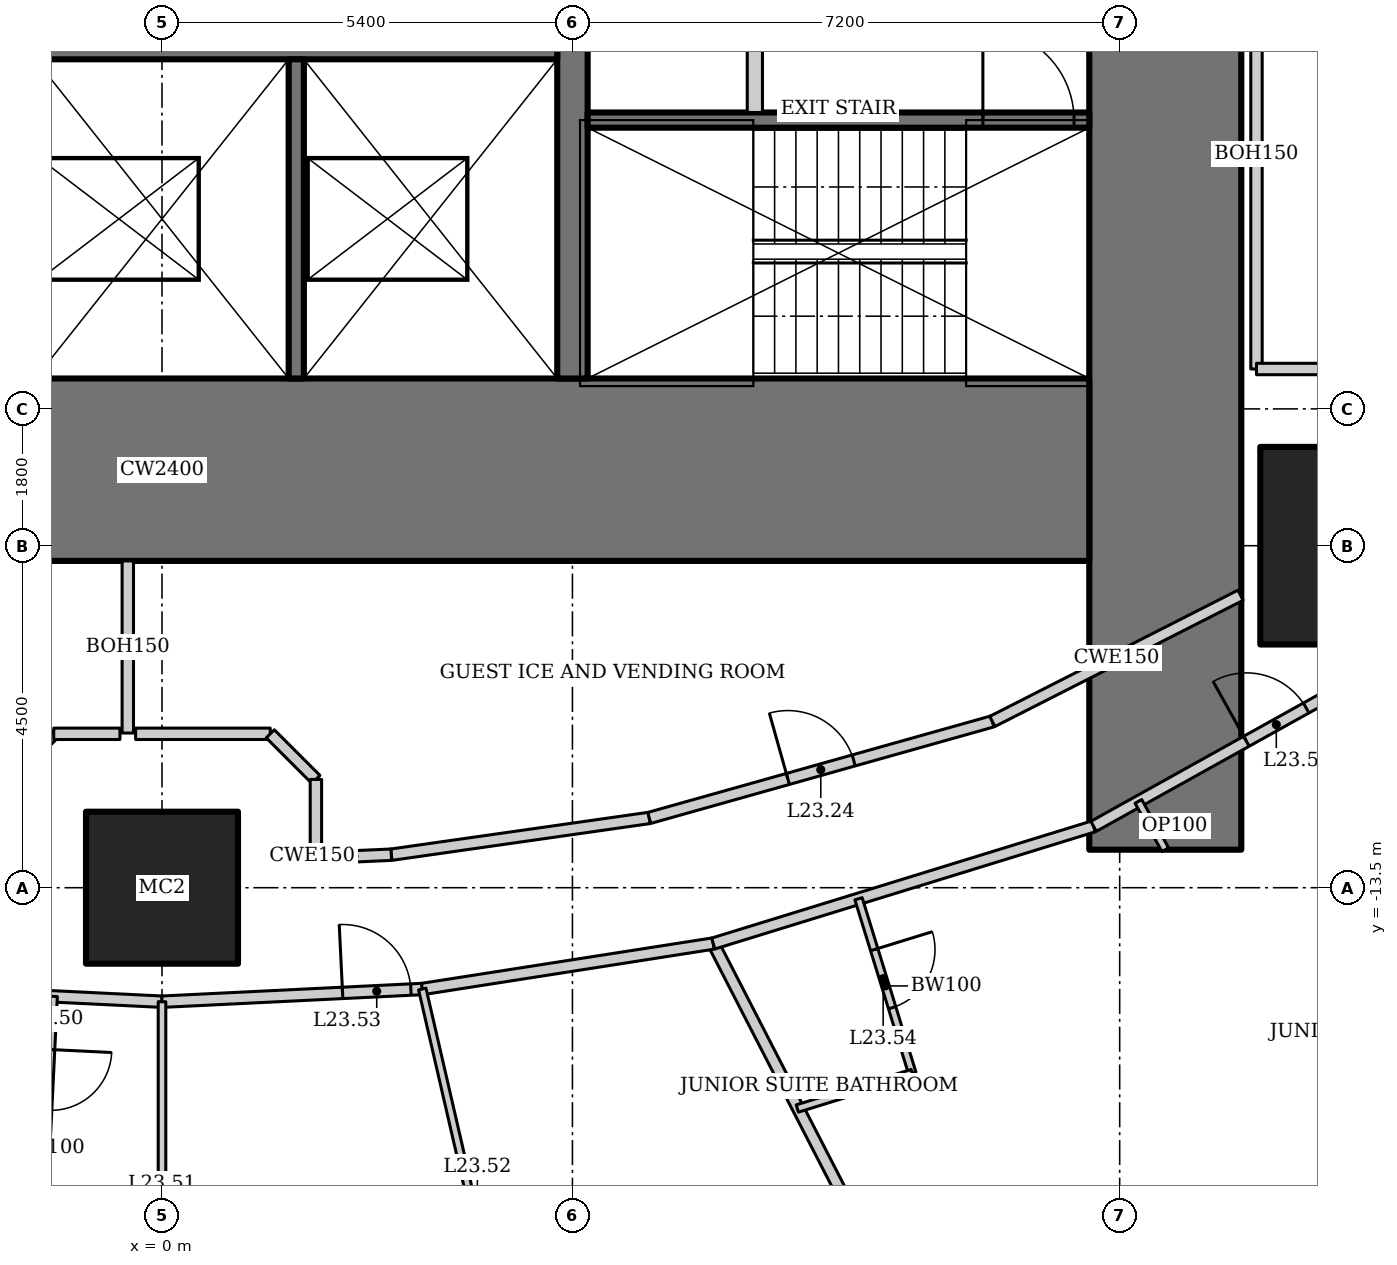
"""IFC4 building model, lengths in metres.
Left out: names, types, materials, properties, quantities, classifications, styles, units other than length and angle.
Written with IfcOpenShell. Run it as: python <this file> out.ifc"""

import sys

from ifc_helpers import new_model, si_unit, direction, frame, frame_2d, origin, origin_2d, place, context, subcontext, project, spatial, rectangle, hollow_rectangle, extrude, element, fill, save


model = new_model("IFC4")
c1 = context("Model", 3, precision=1e-05, world=origin(), true_north=direction((0.0, 1.0)))
c2 = subcontext(c1, "Body", "Model", "MODEL_VIEW")
j1 = project(units=[si_unit("LENGTHUNIT", "METRE"), si_unit("PLANEANGLEUNIT", "RADIAN")], contexts=[c1])
p1 = place(None, origin())
s1 = spatial("IfcSite", under=j1, at=p1, CompositionType="ELEMENT")
p2 = place(p1, origin())
s2 = spatial("IfcBuilding", under=s1, at=p2, CompositionType="ELEMENT")
p3 = place(p2, frame((0.0, 0.0, 98.2)))
s3 = spatial("IfcBuildingStorey", under=s2, at=p3, CompositionType="ELEMENT", Elevation=98.2)
p4 = place(p3, frame((0.0, -13.5, 0.0), z_axis=(0.0, 0.0, 1.0), x_axis=(1.0, 0.0, 0.0)))
e1 = element("IfcColumn", 1, at=p4, inside=s3, PredefinedType="COLUMN", context=c2, shape_type="SweptSolid", body=[
    extrude(hollow_rectangle(XDim=2.0, YDim=2.0, WallThickness=0.17, at=origin_2d()), origin(), (0.0, 0.0, 1.0), 3.6),
])
p5 = place(p3, frame((15.75, -9.0, 0.0), z_axis=(0.0, 0.0, 1.0), x_axis=(1.0, 0.0, 0.0)))
e2 = element("IfcColumn", 2, at=p5, inside=s3, PredefinedType="COLUMN", context=c2, shape_type="SweptSolid", body=[
    extrude(hollow_rectangle(XDim=2.6, YDim=2.6, WallThickness=0.13, at=origin_2d()), origin(), (0.0, 0.0, 1.0), 3.6),
])
p6 = place(p3, frame((13.2, -13.0, 0.0), z_axis=(0.0, 0.0, 1.0), x_axis=(0.0, 1.0, 0.0)))
e3 = element("IfcWall", 3, at=p6, inside=s3, PredefinedType="SHEAR", context=c2, shape_type="SweptSolid", body=[
    extrude(rectangle(XDim=26.0, YDim=2.0, at=frame_2d((13.0, 0.0))), origin(), (0.0, 0.0, 1.0), 3.6),
])
p7 = place(p6, frame((12.1, 0.0, 0.0)))
e4 = element("IfcOpeningElement", 4, at=p7, cuts=e3, PredefinedType="OPENING", context=c2, shape_type="SweptSolid", body=[
    extrude(rectangle(XDim=1.8, YDim=2.1, at=frame_2d((0.9, 1.05))), frame((0.0, 1.01, 0.0), z_axis=(0.0, -1.0, 0.0), x_axis=(1.0, 0.0, 0.0)), (0.0, 0.0, 1.0), 2.02),
])
p8 = place(p3, frame((-12.2, -8.0, 0.0), z_axis=(0.0, 0.0, 1.0), x_axis=(1.0, 0.0, 0.0)))
e5 = element("IfcWall", 5, at=p8, inside=s3, PredefinedType="SHEAR", context=c2, shape_type="SweptSolid", body=[
    extrude(rectangle(XDim=24.4, YDim=2.4, at=frame_2d((12.2, 0.0))), origin(), (0.0, 0.0, 1.0), 3.6),
])
p9 = place(p3, frame((5.4, -6.8, 0.0), z_axis=(0.0, 0.0, 1.0), x_axis=(0.0, 1.0, 0.0)))
e6 = element("IfcWall", 6, at=p9, inside=s3, PredefinedType="SHEAR", context=c2, shape_type="SweptSolid", body=[
    extrude(rectangle(XDim=13.6, YDim=0.4, at=frame_2d((6.8, 0.0))), origin(), (0.0, 0.0, 1.0), 3.6),
])
p10 = place(p9, frame((5.9, 0.0, 0.0)))
e7 = element("IfcOpeningElement", 7, at=p10, cuts=e6, PredefinedType="OPENING", context=c2, shape_type="SweptSolid", body=[
    extrude(rectangle(XDim=1.8, YDim=2.1, at=frame_2d((0.9, 1.05))), frame((0.0, 0.21, 0.0), z_axis=(0.0, -1.0, 0.0), x_axis=(1.0, 0.0, 0.0)), (0.0, 0.0, 1.0), 0.42),
])
p11 = place(p3, frame((-5.2, -2.4, 0.0), z_axis=(0.0, 0.0, 1.0), x_axis=(1.0, 0.0, 0.0)))
e8 = element("IfcWall", 8, at=p11, inside=s3, PredefinedType="SHEAR", context=c2, shape_type="SweptSolid", body=[
    extrude(rectangle(XDim=10.4, YDim=0.4, at=frame_2d((5.2, 0.0))), origin(), (0.0, 0.0, 1.0), 3.6),
])
p12 = place(p11, frame((0.55, 0.0, 0.0)))
e9 = element("IfcOpeningElement", 9, at=p12, cuts=e8, PredefinedType="OPENING", context=c2, shape_type="SweptSolid", body=[
    extrude(rectangle(XDim=1.1, YDim=2.2, at=frame_2d((0.55, 1.1))), frame((0.0, 0.21, 0.0), z_axis=(0.0, -1.0, 0.0), x_axis=(1.0, 0.0, 0.0)), (0.0, 0.0, 1.0), 0.42),
])
p13 = place(p11, frame((4.083, 0.0, 0.0)))
e10 = element("IfcOpeningElement", 10, at=p13, cuts=e8, PredefinedType="OPENING", context=c2, shape_type="SweptSolid", body=[
    extrude(rectangle(XDim=1.1, YDim=2.2, at=frame_2d((0.55, 1.1))), frame((0.0, 0.21, 0.0), z_axis=(0.0, -1.0, 0.0), x_axis=(1.0, 0.0, 0.0)), (0.0, 0.0, 1.0), 0.42),
])
p14 = place(p11, frame((7.617, 0.0, 0.0)))
e11 = element("IfcOpeningElement", 11, at=p14, cuts=e8, PredefinedType="OPENING", context=c2, shape_type="SweptSolid", body=[
    extrude(rectangle(XDim=1.1, YDim=2.2, at=frame_2d((0.55, 1.1))), frame((0.0, 0.21, 0.0), z_axis=(0.0, -1.0, 0.0), x_axis=(1.0, 0.0, 0.0)), (0.0, 0.0, 1.0), 0.42),
])
p15 = place(p3, frame((1.767, -2.6, 0.0), z_axis=(0.0, 0.0, 1.0), x_axis=(0.0, -1.0, 0.0)))
e12 = element("IfcWall", 12, at=p15, inside=s3, PredefinedType="SOLIDWALL", context=c2, shape_type="SweptSolid", body=[
    extrude(rectangle(XDim=4.2, YDim=0.2, at=frame_2d((2.1, 0.0))), origin(), (0.0, 0.0, 1.0), 3.6),
])
p16 = place(p3, frame((5.6, -3.4, 0.0), z_axis=(0.0, 0.0, 1.0), x_axis=(1.0, 0.0, 0.0)))
e13 = element("IfcWall", 13, at=p16, inside=s3, PredefinedType="SHEAR", context=c2, shape_type="SweptSolid", body=[
    extrude(rectangle(XDim=6.6, YDim=0.2, at=frame_2d((3.3, 0.0))), origin(), (0.0, 0.0, 1.0), 3.6),
])
p17 = place(p16, frame((5.2, 0.0, 0.0)))
e14 = element("IfcOpeningElement", 14, at=p17, cuts=e13, PredefinedType="OPENING", context=c2, shape_type="SweptSolid", body=[
    extrude(rectangle(XDim=1.2, YDim=2.1, at=frame_2d((0.6, 1.05))), frame((0.0, 0.11, 0.0), z_axis=(0.0, -1.0, 0.0), x_axis=(1.0, 0.0, 0.0)), (0.0, 0.0, 1.0), 0.22),
])
p18 = place(p3, frame((7.8, -1.4, 0.0), z_axis=(0.0, 0.0, 1.0), x_axis=(0.0, -1.0, 0.0)))
e15 = element("IfcWall", 15, at=p18, inside=s3, PredefinedType="SOLIDWALL", context=c2, shape_type="SweptSolid", body=[
    extrude(rectangle(XDim=1.9, YDim=0.2, at=frame_2d((0.95, 0.0))), origin(), (0.0, 0.0, 1.0), 3.45),
])
p19 = place(p3, frame((10.912, -21.346, 0.0), z_axis=(0.0, 0.0, 1.0), x_axis=(-0.45752665959, 0.889195904042, 0.0)))
e16 = element("IfcWall", 16, at=p19, inside=s3, PredefinedType="PARTITIONING", context=c2, shape_type="SweptSolid", body=[
    extrude(rectangle(XDim=7.997, YDim=0.15, at=frame_2d((3.999, 0.0))), origin(), (0.0, 0.0, 1.0), 2.528),
])
p20 = place(p3, frame((-3.424, -14.833, 0.0), z_axis=(0.0, 0.0, 1.0), x_axis=(0.998809560203, -0.048779733975, 0.0)))
e17 = element("IfcWall", 17, at=p20, inside=s3, PredefinedType="PARTITIONING", context=c2, shape_type="SweptSolid", body=[
    extrude(rectangle(XDim=3.428, YDim=0.15, at=frame_2d((1.714, 0.0))), origin(), (0.0, 0.0, 1.0), 3.45),
])
p21 = place(p3, frame((0.0, -15.0, 0.0), z_axis=(0.0, 0.0, 1.0), x_axis=(0.998809560203, 0.048779733975, 0.0)))
e18 = element("IfcWall", 18, at=p21, inside=s3, PredefinedType="PARTITIONING", context=c2, shape_type="SweptSolid", body=[
    extrude(rectangle(XDim=3.428, YDim=0.15, at=frame_2d((1.714, 0.0))), origin(), (0.0, 0.0, 1.0), 3.45),
])
p22 = place(p21, frame((2.378, 0.0, 0.0)))
e19 = element("IfcOpeningElement", 19, at=p22, cuts=e18, PredefinedType="OPENING", context=c2, shape_type="SweptSolid", body=[
    extrude(rectangle(XDim=0.9, YDim=2.1, at=frame_2d((0.45, 1.05))), frame((0.0, 0.085, 0.0), z_axis=(0.0, -1.0, 0.0), x_axis=(1.0, 0.0, 0.0)), (0.0, 0.0, 1.0), 0.17),
])
p23 = place(p3, frame((3.424, -14.833, 0.0), z_axis=(0.0, 0.0, 1.0), x_axis=(0.988015036573, 0.154357660987, 0.0)))
e20 = element("IfcWall", 20, at=p23, inside=s3, PredefinedType="PARTITIONING", context=c2, shape_type="SweptSolid", body=[
    extrude(rectangle(XDim=3.875, YDim=0.15, at=frame_2d((1.938, 0.0))), origin(), (0.0, 0.0, 1.0), 3.45),
])
p24 = place(p3, frame((7.253, -14.235, 0.0), z_axis=(0.0, 0.0, 1.0), x_axis=(0.955657956744, 0.294478980085, 0.0)))
e21 = element("IfcWall", 21, at=p24, inside=s3, PredefinedType="PARTITIONING", context=c2, shape_type="SweptSolid", body=[
    extrude(rectangle(XDim=5.236, YDim=0.15, at=frame_2d((2.618, 0.0))), origin(), (0.0, 0.0, 1.0), 3.45),
])
p25 = place(p3, frame((12.257, -12.693, 0.0), z_axis=(0.0, 0.0, 1.0), x_axis=(0.873695910579, 0.486472461541, 0.0)))
e22 = element("IfcWall", 22, at=p25, inside=s3, PredefinedType="PARTITIONING", context=c2, shape_type="SweptSolid", body=[
    extrude(rectangle(XDim=5.771, YDim=0.15, at=frame_2d((2.885, 0.0))), origin(), (0.0, 0.0, 1.0), 3.45),
])
p26 = place(p25, frame((2.301, 0.0, 0.0)))
e23 = element("IfcOpeningElement", 23, at=p26, cuts=e22, PredefinedType="OPENING", context=c2, shape_type="SweptSolid", body=[
    extrude(rectangle(XDim=0.9, YDim=2.1, at=frame_2d((0.45, 1.05))), frame((0.0, 0.085, 0.0), z_axis=(0.0, -1.0, 0.0), x_axis=(1.0, 0.0, 0.0)), (0.0, 0.0, 1.0), 0.17),
])
p27 = place(p3, frame((3.016, -13.066, 0.0), z_axis=(0.0, 0.0, 1.0), x_axis=(0.990002114939, 0.14105251652, 0.0)))
e24 = element("IfcWall", 24, at=p27, inside=s3, PredefinedType="PARTITIONING", context=c2, shape_type="SweptSolid", body=[
    extrude(rectangle(XDim=3.429, YDim=0.15, at=frame_2d((1.714, 0.0))), origin(), (0.0, 0.0, 1.0), 3.45),
])
p28 = place(p3, frame((6.411, -12.582, 0.0), z_axis=(0.0, 0.0, 1.0), x_axis=(0.962643729928, 0.270771211967, 0.0)))
e25 = element("IfcWall", 25, at=p28, inside=s3, PredefinedType="PARTITIONING", context=c2, shape_type="SweptSolid", body=[
    extrude(rectangle(XDim=4.688, YDim=0.15, at=frame_2d((2.344, 0.0))), origin(), (0.0, 0.0, 1.0), 3.45),
])
p29 = place(p28, frame((1.894, 0.0, 0.0)))
e26 = element("IfcOpeningElement", 26, at=p29, cuts=e25, PredefinedType="OPENING", context=c2, shape_type="SweptSolid", body=[
    extrude(rectangle(XDim=0.9, YDim=2.1, at=frame_2d((0.45, 1.05))), frame((0.0, 0.085, 0.0), z_axis=(0.0, -1.0, 0.0), x_axis=(1.0, 0.0, 0.0)), (0.0, 0.0, 1.0), 0.17),
])
p30 = place(p3, frame((-1.427, -14.93, 0.0), z_axis=(0.0, 0.0, 1.0), x_axis=(-0.048831470304, -0.998807032168, 0.0)))
e27 = element("IfcWall", 27, at=p30, inside=s3, PredefinedType="PARTITIONING", context=c2, shape_type="SweptSolid", body=[
    extrude(rectangle(XDim=2.4, YDim=0.1, at=frame_2d((1.2, 0.0))), origin(), (0.0, 0.0, 1.0), 3.45),
])
p31 = place(p30, frame((0.7, 0.0, 0.0)))
e28 = element("IfcOpeningElement", 28, at=p31, cuts=e27, PredefinedType="OPENING", context=c2, shape_type="SweptSolid", body=[
    extrude(rectangle(XDim=0.8, YDim=2.1, at=frame_2d((0.4, 1.05))), frame((0.0, 0.06, 0.0), z_axis=(0.0, -1.0, 0.0), x_axis=(1.0, 0.0, 0.0)), (0.0, 0.0, 1.0), 0.12),
])
p32 = place(p3, frame((0.0, -21.4, 0.0), z_axis=(0.0, 0.0, 1.0), x_axis=(0.0, 1.0, 0.0)))
e29 = element("IfcWall", 29, at=p32, inside=s3, PredefinedType="PARTITIONING", context=c2, shape_type="SweptSolid", body=[
    extrude(rectangle(XDim=6.4, YDim=0.1, at=frame_2d((3.2, 0.0))), origin(), (0.0, 0.0, 1.0), 2.924),
])
p33 = place(p32, frame((2.75, 0.0, 0.0)))
e30 = element("IfcOpeningElement", 30, at=p33, cuts=e29, PredefinedType="OPENING", context=c2, shape_type="SweptSolid", body=[
    extrude(rectangle(XDim=0.9, YDim=2.1, at=frame_2d((0.45, 1.05))), frame((0.0, 0.06, 0.0), z_axis=(0.0, -1.0, 0.0), x_axis=(1.0, 0.0, 0.0)), (0.0, 0.0, 1.0), 0.12),
])
p34 = place(p3, frame((4.874, -21.111, 0.0), z_axis=(0.0, 0.0, 1.0), x_axis=(-0.224959129168, 0.97436820053, 0.0)))
e31 = element("IfcWall", 31, at=p34, inside=s3, PredefinedType="PARTITIONING", context=c2, shape_type="SweptSolid", body=[
    extrude(rectangle(XDim=6.443, YDim=0.1, at=frame_2d((3.222, 0.0))), origin(), (0.0, 0.0, 1.0), 2.767),
])
p35 = place(p34, frame((2.771, 0.0, 0.0)))
e32 = element("IfcOpeningElement", 32, at=p35, cuts=e31, PredefinedType="OPENING", context=c2, shape_type="SweptSolid", body=[
    extrude(rectangle(XDim=0.9, YDim=2.1, at=frame_2d((0.45, 1.05))), frame((0.0, 0.06, 0.0), z_axis=(0.0, -1.0, 0.0), x_axis=(1.0, 0.0, 0.0)), (0.0, 0.0, 1.0), 0.12),
])
p36 = place(p3, frame((9.164, -13.646, 0.0), z_axis=(0.0, 0.0, 1.0), x_axis=(0.294507586191, -0.955649141514, 0.0)))
e33 = element("IfcWall", 33, at=p36, inside=s3, PredefinedType="PARTITIONING", context=c2, shape_type="SweptSolid", body=[
    extrude(rectangle(XDim=2.4, YDim=0.1, at=frame_2d((1.2, 0.0))), origin(), (0.0, 0.0, 1.0), 3.45),
])
p37 = place(p36, frame((0.7, 0.0, 0.0)))
e34 = element("IfcOpeningElement", 34, at=p37, cuts=e33, PredefinedType="OPENING", context=c2, shape_type="SweptSolid", body=[
    extrude(rectangle(XDim=0.8, YDim=2.1, at=frame_2d((0.4, 1.05))), frame((0.0, 0.06, 0.0), z_axis=(0.0, -1.0, 0.0), x_axis=(1.0, 0.0, 0.0)), (0.0, 0.0, 1.0), 0.12),
])
p38 = place(p3, frame((9.871, -15.939, 0.0), z_axis=(0.0, 0.0, 1.0), x_axis=(-0.955642133669, -0.29453032502, 0.0)))
e35 = element("IfcWall", 35, at=p38, inside=s3, PredefinedType="PARTITIONING", context=c2, shape_type="SweptSolid", body=[
    extrude(rectangle(XDim=1.583, YDim=0.1, at=frame_2d((0.791, 0.0))), origin(), (0.0, 0.0, 1.0), 3.45),
])
p39 = place(p3, frame((13.2, -13.0, 0.0), z_axis=(0.0, 0.0, 1.0), x_axis=(-0.486383760903, 0.873745293051, 0.0)))
e36 = element("IfcWall", 36, at=p39, inside=s3, PredefinedType="PARTITIONING", context=c2, shape_type="SweptSolid", body=[
    extrude(rectangle(XDim=0.727, YDim=0.1, at=frame_2d((0.364, 0.0))), origin(), (0.0, 0.0, 1.0), 3.45),
])
p40 = place(p3, frame((2.035, -13.109, 0.0), z_axis=(0.0, 0.0, 1.0), x_axis=(0.999010128674, 0.044483286824, 0.0)))
e37 = element("IfcWall", 37, at=p40, inside=s3, PredefinedType="PARTITIONING", context=c2, shape_type="SweptSolid", body=[
    extrude(rectangle(XDim=0.982, YDim=0.15, at=frame_2d((0.491, 0.0))), origin(), (0.0, 0.0, 1.0), 3.45),
])
p41 = place(p3, frame((-0.45, -9.2, 0.0), z_axis=(0.0, 0.0, 1.0), x_axis=(0.0, -1.0, 0.0)))
e38 = element("IfcWall", 38, at=p41, inside=s3, PredefinedType="PARTITIONING", context=c2, shape_type="SweptSolid", body=[
    extrude(rectangle(XDim=2.265, YDim=0.15, at=frame_2d((1.133, 0.0))), origin(), (0.0, 0.0, 1.0), 3.45),
])
p42 = place(p3, frame((-2.025, -12.075, 0.0), z_axis=(0.0, 0.0, 1.0), x_axis=(0.707106781187, 0.707106781187, 0.0)))
e39 = element("IfcWall", 39, at=p42, inside=s3, PredefinedType="PARTITIONING", context=c2, shape_type="SweptSolid", body=[
    extrude(rectangle(XDim=0.849, YDim=0.15, at=frame_2d((0.425, 0.0))), origin(), (0.0, 0.0, 1.0), 3.45),
])
p43 = place(p3, frame((-1.425, -11.475, 0.0), z_axis=(0.0, 0.0, 1.0), x_axis=(1.0, 0.0, 0.0)))
e40 = element("IfcWall", 40, at=p43, inside=s3, PredefinedType="PARTITIONING", context=c2, shape_type="SweptSolid", body=[
    extrude(rectangle(XDim=0.871, YDim=0.15, at=frame_2d((0.436, 0.0))), origin(), (0.0, 0.0, 1.0), 3.45),
])
p44 = place(p3, frame((-0.347, -11.475, 0.0), z_axis=(0.0, 0.0, 1.0), x_axis=(1.0, 0.0, 0.0)))
e41 = element("IfcWall", 41, at=p44, inside=s3, PredefinedType="PARTITIONING", context=c2, shape_type="SweptSolid", body=[
    extrude(rectangle(XDim=1.771, YDim=0.15, at=frame_2d((0.886, 0.0))), origin(), (0.0, 0.0, 1.0), 3.45),
])
p45 = place(p3, frame((1.425, -11.475, 0.0), z_axis=(0.0, 0.0, 1.0), x_axis=(0.707106781187, -0.707106781187, 0.0)))
e42 = element("IfcWall", 42, at=p45, inside=s3, PredefinedType="PARTITIONING", context=c2, shape_type="SweptSolid", body=[
    extrude(rectangle(XDim=0.849, YDim=0.15, at=frame_2d((0.425, 0.0))), origin(), (0.0, 0.0, 1.0), 3.45),
])
p46 = place(p3, frame((2.025, -12.075, 0.0), z_axis=(0.0, 0.0, 1.0), x_axis=(0.0, -1.0, 0.0)))
e43 = element("IfcWall", 43, at=p46, inside=s3, PredefinedType="PARTITIONING", context=c2, shape_type="SweptSolid", body=[
    extrude(rectangle(XDim=0.93, YDim=0.15, at=frame_2d((0.465, 0.0))), origin(), (0.0, 0.0, 1.0), 2.749),
])
p47 = place(p3, frame((10.924, -11.312, 0.0), z_axis=(0.0, 0.0, 1.0), x_axis=(0.891394713219, 0.453227829292, 0.0)))
e44 = element("IfcWall", 44, at=p47, inside=s3, PredefinedType="PARTITIONING", context=c2, shape_type="SweptSolid", body=[
    extrude(rectangle(XDim=3.664, YDim=0.15, at=frame_2d((1.832, 0.0))), origin(), (0.0, 0.0, 1.0), 3.45),
])
p48 = place(p3, frame((14.4, -1.005, 0.0), z_axis=(0.0, 0.0, 1.0), x_axis=(0.0, -1.0, 0.0)))
e45 = element("IfcWall", 45, at=p48, inside=s3, PredefinedType="PARTITIONING", context=c2, shape_type="SweptSolid", body=[
    extrude(rectangle(XDim=5.67, YDim=0.15, at=frame_2d((2.835, 0.0))), origin(), (0.0, 0.0, 1.0), 3.45),
])
p49 = place(p3, frame((14.4, -6.675, 0.0), z_axis=(0.0, 0.0, 1.0), x_axis=(1.0, 0.0, 0.0)))
e46 = element("IfcWall", 46, at=p49, inside=s3, PredefinedType="PARTITIONING", context=c2, shape_type="SweptSolid", body=[
    extrude(rectangle(XDim=3.075, YDim=0.15, at=frame_2d((1.537, 0.0))), origin(), (0.0, 0.0, 1.0), 3.45),
])
p50 = place(p17, origin())
e47 = element("IfcDoor", 47, at=p50, inside=s3, OperationType="SINGLE_SWING_RIGHT", PredefinedType="DOOR", context=c2, shape_type="SweptSolid", body=[
    extrude(rectangle(XDim=1.2, YDim=2.1, at=frame_2d((0.6, 1.05))), frame((0.0, 0.025, 0.0), z_axis=(0.0, -1.0, 0.0), x_axis=(1.0, 0.0, 0.0)), (0.0, 0.0, 1.0), 0.05),
])
fill(e14, e47)
p51 = place(p29, origin())
e48 = element("IfcDoor", 48, at=p51, inside=s3, OperationType="SINGLE_SWING_LEFT", PredefinedType="DOOR", context=c2, shape_type="SweptSolid", body=[
    extrude(rectangle(XDim=0.9, YDim=2.1, at=frame_2d((0.45, 1.05))), frame((0.0, 0.025, 0.0), z_axis=(0.0, -1.0, 0.0), x_axis=(1.0, 0.0, 0.0)), (0.0, 0.0, 1.0), 0.05),
])
fill(e26, e48)
p52 = place(p31, origin())
e49 = element("IfcDoor", 49, at=p52, inside=s3, OperationType="SINGLE_SWING_LEFT", PredefinedType="DOOR", context=c2, shape_type="SweptSolid", body=[
    extrude(rectangle(XDim=0.8, YDim=2.1, at=frame_2d((0.4, 1.05))), frame((0.0, 0.025, 0.0), z_axis=(0.0, -1.0, 0.0), x_axis=(1.0, 0.0, 0.0)), (0.0, 0.0, 1.0), 0.05),
])
fill(e28, e49)
p53 = place(p22, origin())
e50 = element("IfcDoor", 50, at=p53, inside=s3, OperationType="SINGLE_SWING_LEFT", PredefinedType="DOOR", context=c2, shape_type="SweptSolid", body=[
    extrude(rectangle(XDim=0.9, YDim=2.1, at=frame_2d((0.45, 1.05))), frame((0.0, 0.025, 0.0), z_axis=(0.0, -1.0, 0.0), x_axis=(1.0, 0.0, 0.0)), (0.0, 0.0, 1.0), 0.05),
])
fill(e19, e50)
p54 = place(p37, origin())
e51 = element("IfcDoor", 51, at=p54, inside=s3, OperationType="SINGLE_SWING_LEFT", PredefinedType="DOOR", context=c2, shape_type="SweptSolid", body=[
    extrude(rectangle(XDim=0.8, YDim=2.1, at=frame_2d((0.4, 1.05))), frame((0.0, 0.025, 0.0), z_axis=(0.0, -1.0, 0.0), x_axis=(1.0, 0.0, 0.0)), (0.0, 0.0, 1.0), 0.05),
])
fill(e34, e51)
p55 = place(p26, origin())
e52 = element("IfcDoor", 52, at=p55, inside=s3, OperationType="SINGLE_SWING_LEFT", PredefinedType="DOOR", context=c2, shape_type="SweptSolid", body=[
    extrude(rectangle(XDim=0.9, YDim=2.1, at=frame_2d((0.45, 1.05))), frame((0.0, 0.025, 0.0), z_axis=(0.0, -1.0, 0.0), x_axis=(1.0, 0.0, 0.0)), (0.0, 0.0, 1.0), 0.05),
])
fill(e23, e52)
save(model, sys.argv[1])
